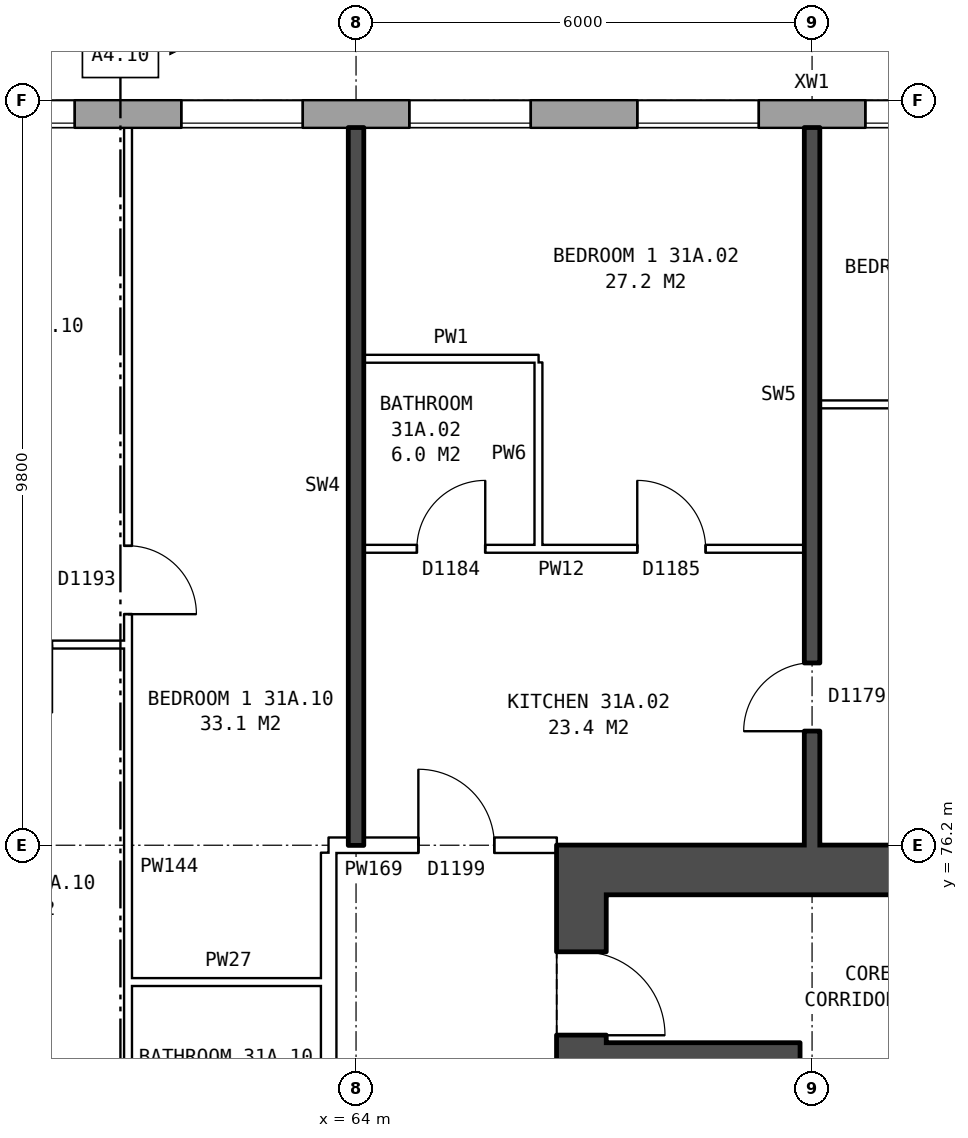
"""IFC4 building model, lengths in metres.
Left out: names, types, materials, properties, quantities, classifications, styles, units other than length and angle.
Written with IfcOpenShell. Run it as: python <this file> out.ifc"""

import sys

from ifc_helpers import new_model, si_unit, direction, frame, frame_2d, origin, place, context, subcontext, project, spatial, rectangle, extrude, element, fill, save


model = new_model("IFC4")
c1 = context("Model", 3, precision=1e-05, world=origin(), true_north=direction((0.0, 1.0)))
c2 = subcontext(c1, "Body", "Model", "MODEL_VIEW")
j1 = project(units=[si_unit("LENGTHUNIT", "METRE"), si_unit("PLANEANGLEUNIT", "RADIAN")], contexts=[c1])
p1 = place(None, origin())
s1 = spatial("IfcSite", under=j1, at=p1, CompositionType="ELEMENT")
p2 = place(p1, origin())
s2 = spatial("IfcBuilding", under=s1, at=p2, CompositionType="ELEMENT")
p3 = place(p2, frame((0.0, 0.0, 111.9)))
s3 = spatial("IfcBuildingStorey", under=s2, at=p3, CompositionType="ELEMENT", Elevation=111.9)
p4 = place(p3, frame((72.925, 85.82, 0.0), z_axis=(0.0, 0.0, 1.0), x_axis=(-1.0, 0.0, 0.0)))
e1 = element("IfcWall", 1, at=p4, inside=s3, PredefinedType="STANDARD", context=c2, shape_type="SweptSolid", body=[
    extrude(rectangle(XDim=44.851, YDim=0.36, at=frame_2d((22.425, 0.0))), origin(), (0.0, 0.0, 1.0), 2.85),
])
p5 = place(p4, frame((0.625, 0.0, 0.8)))
e2 = element("IfcOpeningElement", 2, at=p5, cuts=e1, PredefinedType="OPENING", context=c2, shape_type="SweptSolid", body=[
    extrude(rectangle(XDim=1.6, YDim=1.8, at=frame_2d((0.8, 0.9))), frame((0.0, 0.19, 0.0), z_axis=(0.0, -1.0, 0.0), x_axis=(1.0, 0.0, 0.0)), (0.0, 0.0, 1.0), 0.38),
])
p6 = place(p4, frame((3.625, 0.0, 0.8)))
e3 = element("IfcOpeningElement", 3, at=p6, cuts=e1, PredefinedType="OPENING", context=c2, shape_type="SweptSolid", body=[
    extrude(rectangle(XDim=1.6, YDim=1.8, at=frame_2d((0.8, 0.9))), frame((0.0, 0.19, 0.0), z_axis=(0.0, -1.0, 0.0), x_axis=(1.0, 0.0, 0.0)), (0.0, 0.0, 1.0), 0.38),
])
p7 = place(p4, frame((6.625, 0.0, 0.8)))
e4 = element("IfcOpeningElement", 4, at=p7, cuts=e1, PredefinedType="OPENING", context=c2, shape_type="SweptSolid", body=[
    extrude(rectangle(XDim=1.6, YDim=1.8, at=frame_2d((0.8, 0.9))), frame((0.0, 0.19, 0.0), z_axis=(0.0, -1.0, 0.0), x_axis=(1.0, 0.0, 0.0)), (0.0, 0.0, 1.0), 0.38),
])
p8 = place(p4, frame((9.625, 0.0, 0.8)))
e5 = element("IfcOpeningElement", 5, at=p8, cuts=e1, PredefinedType="OPENING", context=c2, shape_type="SweptSolid", body=[
    extrude(rectangle(XDim=1.6, YDim=1.8, at=frame_2d((0.8, 0.9))), frame((0.0, 0.19, 0.0), z_axis=(0.0, -1.0, 0.0), x_axis=(1.0, 0.0, 0.0)), (0.0, 0.0, 1.0), 0.38),
])
p9 = place(p4, frame((12.625, 0.0, 0.8)))
e6 = element("IfcOpeningElement", 6, at=p9, cuts=e1, PredefinedType="OPENING", context=c2, shape_type="SweptSolid", body=[
    extrude(rectangle(XDim=1.6, YDim=1.8, at=frame_2d((0.8, 0.9))), frame((0.0, 0.19, 0.0), z_axis=(0.0, -1.0, 0.0), x_axis=(1.0, 0.0, 0.0)), (0.0, 0.0, 1.0), 0.38),
])
p10 = place(p4, frame((15.625, 0.0, 0.8)))
e7 = element("IfcOpeningElement", 7, at=p10, cuts=e1, PredefinedType="OPENING", context=c2, shape_type="SweptSolid", body=[
    extrude(rectangle(XDim=1.6, YDim=1.8, at=frame_2d((0.8, 0.9))), frame((0.0, 0.19, 0.0), z_axis=(0.0, -1.0, 0.0), x_axis=(1.0, 0.0, 0.0)), (0.0, 0.0, 1.0), 0.38),
])
p11 = place(p4, frame((18.125, 0.0, 0.8)))
e8 = element("IfcOpeningElement", 8, at=p11, cuts=e1, PredefinedType="OPENING", context=c2, shape_type="SweptSolid", body=[
    extrude(rectangle(XDim=1.0, YDim=1.8, at=frame_2d((0.5, 0.9))), frame((0.0, 0.19, 0.0), z_axis=(0.0, -1.0, 0.0), x_axis=(1.0, 0.0, 0.0)), (0.0, 0.0, 1.0), 0.38),
])
p12 = place(p4, frame((21.725, 0.0, 0.55)))
e9 = element("IfcOpeningElement", 9, at=p12, cuts=e1, PredefinedType="OPENING", context=c2, shape_type="SweptSolid", body=[
    extrude(rectangle(XDim=1.4, YDim=1.2, at=frame_2d((0.7, 0.6))), frame((0.0, 0.19, 0.0), z_axis=(0.0, -1.0, 0.0), x_axis=(1.0, 0.0, 0.0)), (0.0, 0.0, 1.0), 0.38),
])
p13 = place(p4, frame((24.425, 0.0, 1.7)))
e10 = element("IfcOpeningElement", 10, at=p13, cuts=e1, PredefinedType="OPENING", context=c2, shape_type="SweptSolid", body=[
    extrude(rectangle(XDim=1.0, YDim=0.9, at=frame_2d((0.5, 0.45))), frame((0.0, 0.19, 0.0), z_axis=(0.0, -1.0, 0.0), x_axis=(1.0, 0.0, 0.0)), (0.0, 0.0, 1.0), 0.38),
])
p14 = place(p4, frame((27.625, 0.0, 0.8)))
e11 = element("IfcOpeningElement", 11, at=p14, cuts=e1, PredefinedType="OPENING", context=c2, shape_type="SweptSolid", body=[
    extrude(rectangle(XDim=1.6, YDim=1.8, at=frame_2d((0.8, 0.9))), frame((0.0, 0.19, 0.0), z_axis=(0.0, -1.0, 0.0), x_axis=(1.0, 0.0, 0.0)), (0.0, 0.0, 1.0), 0.38),
])
p15 = place(p4, frame((30.625, 0.0, 0.8)))
e12 = element("IfcOpeningElement", 12, at=p15, cuts=e1, PredefinedType="OPENING", context=c2, shape_type="SweptSolid", body=[
    extrude(rectangle(XDim=1.6, YDim=1.8, at=frame_2d((0.8, 0.9))), frame((0.0, 0.19, 0.0), z_axis=(0.0, -1.0, 0.0), x_axis=(1.0, 0.0, 0.0)), (0.0, 0.0, 1.0), 0.38),
])
p16 = place(p4, frame((33.625, 0.0, 0.8)))
e13 = element("IfcOpeningElement", 13, at=p16, cuts=e1, PredefinedType="OPENING", context=c2, shape_type="SweptSolid", body=[
    extrude(rectangle(XDim=1.6, YDim=1.8, at=frame_2d((0.8, 0.9))), frame((0.0, 0.19, 0.0), z_axis=(0.0, -1.0, 0.0), x_axis=(1.0, 0.0, 0.0)), (0.0, 0.0, 1.0), 0.38),
])
p17 = place(p4, frame((36.625, 0.0, 0.8)))
e14 = element("IfcOpeningElement", 14, at=p17, cuts=e1, PredefinedType="OPENING", context=c2, shape_type="SweptSolid", body=[
    extrude(rectangle(XDim=1.6, YDim=1.8, at=frame_2d((0.8, 0.9))), frame((0.0, 0.19, 0.0), z_axis=(0.0, -1.0, 0.0), x_axis=(1.0, 0.0, 0.0)), (0.0, 0.0, 1.0), 0.38),
])
p18 = place(p4, frame((39.625, 0.0, 0.8)))
e15 = element("IfcOpeningElement", 15, at=p18, cuts=e1, PredefinedType="OPENING", context=c2, shape_type="SweptSolid", body=[
    extrude(rectangle(XDim=1.6, YDim=1.8, at=frame_2d((0.8, 0.9))), frame((0.0, 0.19, 0.0), z_axis=(0.0, -1.0, 0.0), x_axis=(1.0, 0.0, 0.0)), (0.0, 0.0, 1.0), 0.38),
])
p19 = place(p4, frame((42.625, 0.0, 0.8)))
e16 = element("IfcOpeningElement", 16, at=p19, cuts=e1, PredefinedType="OPENING", context=c2, shape_type="SweptSolid", body=[
    extrude(rectangle(XDim=1.6, YDim=1.8, at=frame_2d((0.8, 0.9))), frame((0.0, 0.19, 0.0), z_axis=(0.0, -1.0, 0.0), x_axis=(1.0, 0.0, 0.0)), (0.0, 0.0, 1.0), 0.38),
])
p20 = place(p4, frame((19.425, 0.0, 1.7)))
e17 = element("IfcOpeningElement", 17, at=p20, cuts=e1, PredefinedType="OPENING", context=c2, shape_type="SweptSolid", body=[
    extrude(rectangle(XDim=1.0, YDim=0.9, at=frame_2d((0.5, 0.45))), frame((0.0, 0.19, 0.0), z_axis=(0.0, -1.0, 0.0), x_axis=(1.0, 0.0, 0.0)), (0.0, 0.0, 1.0), 0.38),
])
p21 = place(p4, frame((25.725, 0.0, 0.8)))
e18 = element("IfcOpeningElement", 18, at=p21, cuts=e1, PredefinedType="OPENING", context=c2, shape_type="SweptSolid", body=[
    extrude(rectangle(XDim=1.0, YDim=1.8, at=frame_2d((0.5, 0.9))), frame((0.0, 0.19, 0.0), z_axis=(0.0, -1.0, 0.0), x_axis=(1.0, 0.0, 0.0)), (0.0, 0.0, 1.0), 0.38),
])
p22 = place(p3, frame((66.965, 64.45, 0.0), z_axis=(0.0, 0.0, 1.0), x_axis=(0.0, 1.0, 0.0)))
e19 = element("IfcWall", 19, at=p22, inside=s3, PredefinedType="SHEAR", context=c2, shape_type="SweptSolid", body=[
    extrude(rectangle(XDim=11.1, YDim=0.65, at=frame_2d((5.55, 0.0))), origin(), (0.0, 0.0, 1.0), 2.85),
])
p23 = place(p22, frame((0.675, 0.0, 0.0)))
e20 = element("IfcOpeningElement", 20, at=p23, cuts=e19, PredefinedType="OPENING", context=c2, shape_type="SweptSolid", body=[
    extrude(rectangle(XDim=1.1, YDim=2.1, at=frame_2d((0.55, 1.05))), frame((0.0, 0.335, 0.0), z_axis=(0.0, -1.0, 0.0), x_axis=(1.0, 0.0, 0.0)), (0.0, 0.0, 1.0), 0.67),
])
p24 = place(p22, frame((9.25, 0.0, 0.0)))
e21 = element("IfcOpeningElement", 21, at=p24, cuts=e19, PredefinedType="OPENING", context=c2, shape_type="SweptSolid", body=[
    extrude(rectangle(XDim=1.1, YDim=2.1, at=frame_2d((0.55, 1.05))), frame((0.0, 0.335, 0.0), z_axis=(0.0, -1.0, 0.0), x_axis=(1.0, 0.0, 0.0)), (0.0, 0.0, 1.0), 0.67),
])
p25 = place(p3, frame((66.64, 75.875, 0.0), z_axis=(0.0, 0.0, 1.0), x_axis=(1.0, 0.0, 0.0)))
e22 = element("IfcWall", 22, at=p25, inside=s3, PredefinedType="SHEAR", context=c2, shape_type="SweptSolid", body=[
    extrude(rectangle(XDim=9.0, YDim=0.65, at=frame_2d((4.5, 0.0))), origin(), (0.0, 0.0, 1.0), 2.85),
])
p26 = place(p3, frame((67.29, 73.45, 0.0), z_axis=(0.0, 0.0, 1.0), x_axis=(1.0, 0.0, 0.0)))
e23 = element("IfcWall", 23, at=p26, inside=s3, PredefinedType="SHEAR", context=c2, shape_type="SweptSolid", body=[
    extrude(rectangle(XDim=2.25, YDim=0.3, at=frame_2d((1.125, 0.0))), origin(), (0.0, 0.0, 1.0), 2.85),
])
p27 = place(p3, frame((69.69, 67.0, 0.0), z_axis=(0.0, 0.0, 1.0), x_axis=(0.0, 1.0, 0.0)))
e24 = element("IfcWall", 24, at=p27, inside=s3, PredefinedType="SHEAR", context=c2, shape_type="SweptSolid", body=[
    extrude(rectangle(XDim=6.6, YDim=0.3, at=frame_2d((3.3, 0.0))), origin(), (0.0, 0.0, 1.0), 2.85),
])
p28 = place(p3, frame((63.64, 63.9, 0.0), z_axis=(0.0, 0.0, 1.0), x_axis=(0.0, 1.0, 0.0)))
e25 = element("IfcWall", 25, at=p28, inside=s3, PredefinedType="PARTITIONING", context=c2, shape_type="SweptSolid", body=[
    extrude(rectangle(XDim=12.2, YDim=0.2, at=frame_2d((6.1, 0.0))), origin(), (0.0, 0.0, 1.0), 2.85),
])
p29 = place(p28, frame((5.1, 0.0, 0.0)))
e26 = element("IfcOpeningElement", 26, at=p29, cuts=e25, PredefinedType="OPENING", context=c2, shape_type="SweptSolid", body=[
    extrude(rectangle(XDim=2.0, YDim=2.1, at=frame_2d((1.0, 1.05))), frame((0.0, 0.11, 0.0), z_axis=(0.0, -1.0, 0.0), x_axis=(1.0, 0.0, 0.0)), (0.0, 0.0, 1.0), 0.22),
])
p30 = place(p3, frame((61.0, 74.4, 0.0), z_axis=(0.0, 0.0, 1.0), x_axis=(1.0, 0.0, 0.0)))
e27 = element("IfcWall", 27, at=p30, inside=s3, PredefinedType="PARTITIONING", context=c2, shape_type="SweptSolid", body=[
    extrude(rectangle(XDim=2.64, YDim=0.1, at=frame_2d((1.32, 0.0))), origin(), (0.0, 0.0, 1.0), 2.85),
])
p31 = place(p3, frame((63.64, 76.2, 0.0), z_axis=(0.0, 0.0, 1.0), x_axis=(1.0, 0.0, 0.0)))
e28 = element("IfcWall", 28, at=p31, inside=s3, PredefinedType="PARTITIONING", context=c2, shape_type="SweptSolid", body=[
    extrude(rectangle(XDim=3.0, YDim=0.2, at=frame_2d((1.5, 0.0))), origin(), (0.0, 0.0, 1.0), 2.85),
])
p32 = place(p31, frame((1.18, 0.0, 0.0)))
e29 = element("IfcOpeningElement", 29, at=p32, cuts=e28, PredefinedType="OPENING", context=c2, shape_type="SweptSolid", body=[
    extrude(rectangle(XDim=1.0, YDim=2.1, at=frame_2d((0.5, 1.05))), frame((0.0, 0.11, 0.0), z_axis=(0.0, -1.0, 0.0), x_axis=(1.0, 0.0, 0.0)), (0.0, 0.0, 1.0), 0.22),
])
p33 = place(p3, frame((58.1, 78.84, 0.0), z_axis=(0.0, 0.0, 1.0), x_axis=(1.0, 0.0, 0.0)))
e30 = element("IfcWall", 30, at=p33, inside=s3, PredefinedType="PARTITIONING", context=c2, shape_type="SweptSolid", body=[
    extrude(rectangle(XDim=2.9, YDim=0.1, at=frame_2d((1.45, 0.0))), origin(), (0.0, 0.0, 1.0), 2.85),
])
p34 = place(p33, frame((1.0, 0.0, 0.0)))
e31 = element("IfcOpeningElement", 31, at=p34, cuts=e30, PredefinedType="OPENING", context=c2, shape_type="SweptSolid", body=[
    extrude(rectangle(XDim=0.9, YDim=2.1, at=frame_2d((0.45, 1.05))), frame((0.0, 0.06, 0.0), z_axis=(0.0, -1.0, 0.0), x_axis=(1.0, 0.0, 0.0)), (0.0, 0.0, 1.0), 0.12),
])
p35 = place(p3, frame((64.1, 80.1, 0.0), z_axis=(0.0, 0.0, 1.0), x_axis=(1.0, 0.0, 0.0)))
e32 = element("IfcWall", 32, at=p35, inside=s3, PredefinedType="PARTITIONING", context=c2, shape_type="SweptSolid", body=[
    extrude(rectangle(XDim=5.8, YDim=0.1, at=frame_2d((2.9, 0.0))), origin(), (0.0, 0.0, 1.0), 2.85),
])
p36 = place(p35, frame((3.6, 0.0, 0.0)))
e33 = element("IfcOpeningElement", 33, at=p36, cuts=e32, PredefinedType="OPENING", context=c2, shape_type="SweptSolid", body=[
    extrude(rectangle(XDim=0.9, YDim=2.1, at=frame_2d((0.45, 1.05))), frame((0.0, 0.06, 0.0), z_axis=(0.0, -1.0, 0.0), x_axis=(1.0, 0.0, 0.0)), (0.0, 0.0, 1.0), 0.12),
])
p37 = place(p35, frame((0.7, 0.0, 0.0)))
e34 = element("IfcOpeningElement", 34, at=p37, cuts=e32, PredefinedType="OPENING", context=c2, shape_type="SweptSolid", body=[
    extrude(rectangle(XDim=0.9, YDim=2.1, at=frame_2d((0.45, 1.05))), frame((0.0, 0.06, 0.0), z_axis=(0.0, -1.0, 0.0), x_axis=(1.0, 0.0, 0.0)), (0.0, 0.0, 1.0), 0.12),
])
p38 = place(p3, frame((70.1, 82.0, 0.0), z_axis=(0.0, 0.0, 1.0), x_axis=(1.0, 0.0, 0.0)))
e35 = element("IfcWall", 35, at=p38, inside=s3, PredefinedType="PARTITIONING", context=c2, shape_type="SweptSolid", body=[
    extrude(rectangle(XDim=5.54, YDim=0.1, at=frame_2d((2.77, 0.0))), origin(), (0.0, 0.0, 1.0), 2.85),
])
p39 = place(p38, frame((2.32, 0.0, 0.0)))
e36 = element("IfcOpeningElement", 36, at=p39, cuts=e35, PredefinedType="OPENING", context=c2, shape_type="SweptSolid", body=[
    extrude(rectangle(XDim=0.9, YDim=2.1, at=frame_2d((0.45, 1.05))), frame((0.0, 0.06, 0.0), z_axis=(0.0, -1.0, 0.0), x_axis=(1.0, 0.0, 0.0)), (0.0, 0.0, 1.0), 0.12),
])
p40 = place(p3, frame((64.1, 82.6, 0.0), z_axis=(0.0, 0.0, 1.0), x_axis=(1.0, 0.0, 0.0)))
e37 = element("IfcWall", 37, at=p40, inside=s3, PredefinedType="PARTITIONING", context=c2, shape_type="SweptSolid", body=[
    extrude(rectangle(XDim=2.3, YDim=0.1, at=frame_2d((1.15, 0.0))), origin(), (0.0, 0.0, 1.0), 2.85),
])
p41 = place(p3, frame((61.0, 71.3, 0.0), z_axis=(0.0, 0.0, 1.0), x_axis=(0.0, 1.0, 0.0)))
e38 = element("IfcWall", 38, at=p41, inside=s3, PredefinedType="PARTITIONING", context=c2, shape_type="SweptSolid", body=[
    extrude(rectangle(XDim=14.34, YDim=0.1, at=frame_2d((7.17, 0.0))), origin(), (0.0, 0.0, 1.0), 2.85),
])
p42 = place(p41, frame((7.94, 0.0, 0.0)))
e39 = element("IfcOpeningElement", 39, at=p42, cuts=e38, PredefinedType="OPENING", context=c2, shape_type="SweptSolid", body=[
    extrude(rectangle(XDim=0.9, YDim=2.1, at=frame_2d((0.45, 1.05))), frame((0.0, 0.06, 0.0), z_axis=(0.0, -1.0, 0.0), x_axis=(1.0, 0.0, 0.0)), (0.0, 0.0, 1.0), 0.12),
])
p43 = place(p41, frame((0.4, 0.0, 0.0)))
e40 = element("IfcOpeningElement", 40, at=p43, cuts=e38, PredefinedType="OPENING", context=c2, shape_type="SweptSolid", body=[
    extrude(rectangle(XDim=0.9, YDim=2.1, at=frame_2d((0.45, 1.05))), frame((0.0, 0.06, 0.0), z_axis=(0.0, -1.0, 0.0), x_axis=(1.0, 0.0, 0.0)), (0.0, 0.0, 1.0), 0.12),
])
p44 = place(p3, frame((64.0, 76.2, 0.0), z_axis=(0.0, 0.0, 1.0), x_axis=(0.0, 1.0, 0.0)))
e41 = element("IfcWall", 41, at=p44, inside=s3, PredefinedType="SOLIDWALL", context=c2, shape_type="SweptSolid", body=[
    extrude(rectangle(XDim=9.44, YDim=0.2, at=frame_2d((4.72, 0.0))), origin(), (0.0, 0.0, 1.0), 2.85),
])
p45 = place(p3, frame((66.4, 80.15, 0.0), z_axis=(0.0, 0.0, 1.0), x_axis=(0.0, 1.0, 0.0)))
e42 = element("IfcWall", 42, at=p45, inside=s3, PredefinedType="PARTITIONING", context=c2, shape_type="SweptSolid", body=[
    extrude(rectangle(XDim=2.4, YDim=0.1, at=frame_2d((1.2, 0.0))), origin(), (0.0, 0.0, 1.0), 2.85),
])
p46 = place(p3, frame((70.0, 76.2, 0.0), z_axis=(0.0, 0.0, 1.0), x_axis=(0.0, 1.0, 0.0)))
e43 = element("IfcWall", 43, at=p46, inside=s3, PredefinedType="SOLIDWALL", context=c2, shape_type="SweptSolid", body=[
    extrude(rectangle(XDim=9.44, YDim=0.2, at=frame_2d((4.72, 0.0))), origin(), (0.0, 0.0, 1.0), 2.85),
])
p47 = place(p46, frame((1.5, 0.0, 0.0)))
e44 = element("IfcOpeningElement", 44, at=p47, cuts=e43, PredefinedType="OPENING", context=c2, shape_type="SweptSolid", body=[
    extrude(rectangle(XDim=0.9, YDim=2.1, at=frame_2d((0.45, 1.05))), frame((0.0, 0.11, 0.0), z_axis=(0.0, -1.0, 0.0), x_axis=(1.0, 0.0, 0.0)), (0.0, 0.0, 1.0), 0.22),
])
p48 = place(p5, origin())
e45 = element("IfcWindow", 45, at=p48, inside=s3, PartitioningType="SINGLE_PANEL", PredefinedType="WINDOW", context=c2, shape_type="SweptSolid", body=[
    extrude(rectangle(XDim=1.6, YDim=1.8, at=frame_2d((0.8, 0.9))), frame((0.0, 0.15, 0.0), z_axis=(0.0, -1.0, 0.0), x_axis=(1.0, 0.0, 0.0)), (0.0, 0.0, 1.0), 0.06),
])
fill(e2, e45)
p49 = place(p6, origin())
e46 = element("IfcWindow", 46, at=p49, inside=s3, PartitioningType="SINGLE_PANEL", PredefinedType="WINDOW", context=c2, shape_type="SweptSolid", body=[
    extrude(rectangle(XDim=1.6, YDim=1.8, at=frame_2d((0.8, 0.9))), frame((0.0, 0.15, 0.0), z_axis=(0.0, -1.0, 0.0), x_axis=(1.0, 0.0, 0.0)), (0.0, 0.0, 1.0), 0.06),
])
fill(e3, e46)
p50 = place(p7, origin())
e47 = element("IfcWindow", 47, at=p50, inside=s3, PartitioningType="SINGLE_PANEL", PredefinedType="WINDOW", context=c2, shape_type="SweptSolid", body=[
    extrude(rectangle(XDim=1.6, YDim=1.8, at=frame_2d((0.8, 0.9))), frame((0.0, 0.15, 0.0), z_axis=(0.0, -1.0, 0.0), x_axis=(1.0, 0.0, 0.0)), (0.0, 0.0, 1.0), 0.06),
])
fill(e4, e47)
p51 = place(p8, origin())
e48 = element("IfcWindow", 48, at=p51, inside=s3, PartitioningType="SINGLE_PANEL", PredefinedType="WINDOW", context=c2, shape_type="SweptSolid", body=[
    extrude(rectangle(XDim=1.6, YDim=1.8, at=frame_2d((0.8, 0.9))), frame((0.0, 0.15, 0.0), z_axis=(0.0, -1.0, 0.0), x_axis=(1.0, 0.0, 0.0)), (0.0, 0.0, 1.0), 0.06),
])
fill(e5, e48)
p52 = place(p9, origin())
e49 = element("IfcWindow", 49, at=p52, inside=s3, PartitioningType="SINGLE_PANEL", PredefinedType="WINDOW", context=c2, shape_type="SweptSolid", body=[
    extrude(rectangle(XDim=1.6, YDim=1.8, at=frame_2d((0.8, 0.9))), frame((0.0, 0.15, 0.0), z_axis=(0.0, -1.0, 0.0), x_axis=(1.0, 0.0, 0.0)), (0.0, 0.0, 1.0), 0.06),
])
fill(e6, e49)
p53 = place(p24, frame((1.1, 0.0, 0.0), z_axis=(0.0, 0.0, 1.0), x_axis=(-1.0, 0.0, 0.0)))
e50 = element("IfcDoor", 50, at=p53, inside=s3, OperationType="SINGLE_SWING_RIGHT", PredefinedType="DOOR", context=c2, shape_type="SweptSolid", body=[
    extrude(rectangle(XDim=1.1, YDim=2.1, at=frame_2d((0.55, 1.05))), frame((0.0, 0.31, 0.0), z_axis=(0.0, -1.0, 0.0), x_axis=(1.0, 0.0, 0.0)), (0.0, 0.0, 1.0), 0.05),
])
fill(e21, e50)
p54 = place(p36, origin())
e51 = element("IfcDoor", 51, at=p54, inside=s3, OperationType="SINGLE_SWING_LEFT", PredefinedType="DOOR", context=c2, shape_type="SweptSolid", body=[
    extrude(rectangle(XDim=0.9, YDim=2.1, at=frame_2d((0.45, 1.05))), frame((0.0, 0.025, 0.0), z_axis=(0.0, -1.0, 0.0), x_axis=(1.0, 0.0, 0.0)), (0.0, 0.0, 1.0), 0.05),
])
fill(e33, e51)
p55 = place(p32, origin())
e52 = element("IfcDoor", 52, at=p55, inside=s3, OperationType="SINGLE_SWING_LEFT", PredefinedType="DOOR", context=c2, shape_type="SweptSolid", body=[
    extrude(rectangle(XDim=1.0, YDim=2.1, at=frame_2d((0.5, 1.05))), frame((0.0, 0.025, 0.0), z_axis=(0.0, -1.0, 0.0), x_axis=(1.0, 0.0, 0.0)), (0.0, 0.0, 1.0), 0.05),
])
fill(e29, e52)
p56 = place(p47, origin())
e53 = element("IfcDoor", 53, at=p56, inside=s3, OperationType="SINGLE_SWING_LEFT", PredefinedType="DOOR", context=c2, shape_type="SweptSolid", body=[
    extrude(rectangle(XDim=0.9, YDim=2.1, at=frame_2d((0.45, 1.05))), frame((0.0, 0.025, 0.0), z_axis=(0.0, -1.0, 0.0), x_axis=(1.0, 0.0, 0.0)), (0.0, 0.0, 1.0), 0.05),
])
fill(e44, e53)
p57 = place(p37, origin())
e54 = element("IfcDoor", 54, at=p57, inside=s3, OperationType="SINGLE_SWING_RIGHT", PredefinedType="DOOR", context=c2, shape_type="SweptSolid", body=[
    extrude(rectangle(XDim=0.9, YDim=2.1, at=frame_2d((0.45, 1.05))), frame((0.0, 0.025, 0.0), z_axis=(0.0, -1.0, 0.0), x_axis=(1.0, 0.0, 0.0)), (0.0, 0.0, 1.0), 0.05),
])
fill(e34, e54)
p58 = place(p42, frame((0.9, 0.0, 0.0), z_axis=(0.0, 0.0, 1.0), x_axis=(-1.0, 0.0, 0.0)))
e55 = element("IfcDoor", 55, at=p58, inside=s3, OperationType="SINGLE_SWING_RIGHT", PredefinedType="DOOR", context=c2, shape_type="SweptSolid", body=[
    extrude(rectangle(XDim=0.9, YDim=2.1, at=frame_2d((0.45, 1.05))), frame((0.0, 0.025, 0.0), z_axis=(0.0, -1.0, 0.0), x_axis=(1.0, 0.0, 0.0)), (0.0, 0.0, 1.0), 0.05),
])
fill(e39, e55)
save(model, sys.argv[1])
